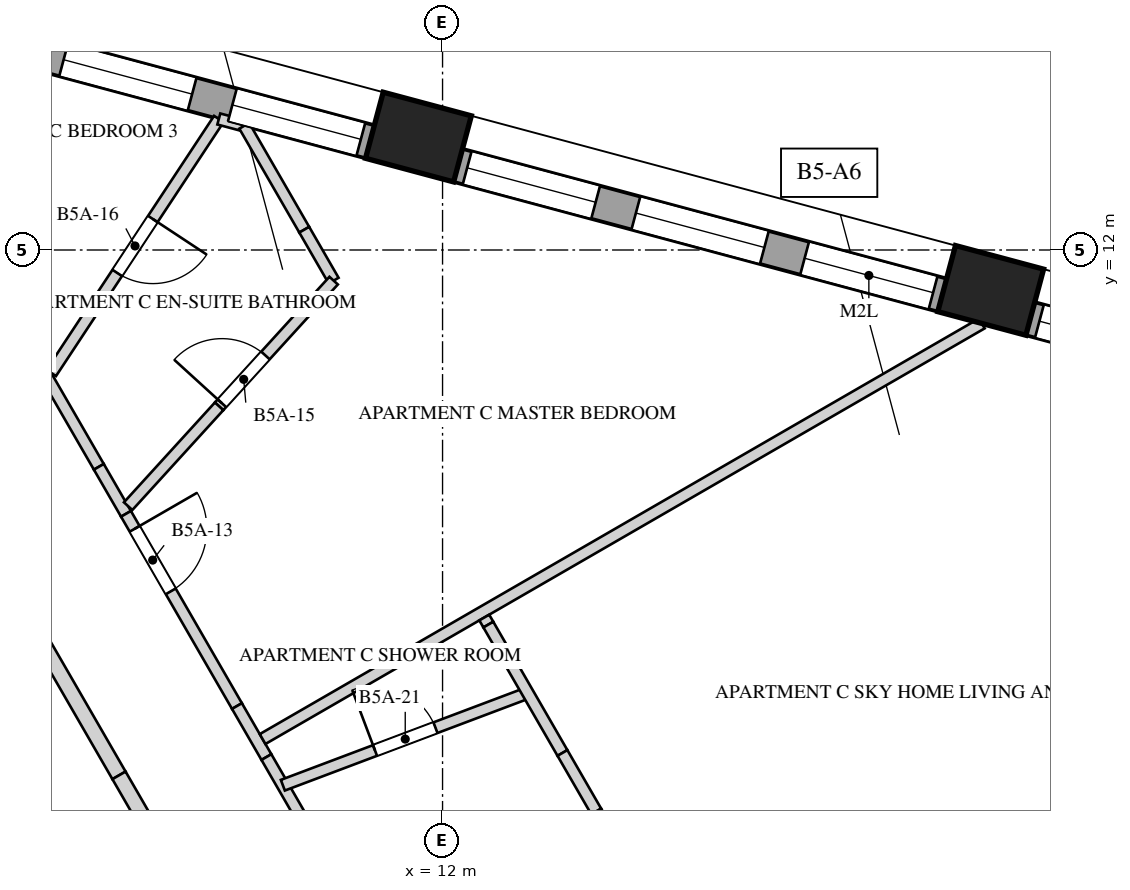
"""IFC4 building model, lengths in metres.
Left out: names, types, materials, properties, quantities, classifications, styles, units other than length and angle.
Written with IfcOpenShell. Run it as: python <this file> out.ifc"""

import sys

from ifc_helpers import new_model, si_unit, direction, frame, frame_2d, origin, origin_2d, place, context, subcontext, project, spatial, rectangle, extrude, element, fill, save


model = new_model("IFC4")
c1 = context("Model", 3, precision=1e-05, world=origin(), true_north=direction((0.0, 1.0)))
c2 = subcontext(c1, "Body", "Model", "MODEL_VIEW")
j1 = project(units=[si_unit("LENGTHUNIT", "METRE"), si_unit("PLANEANGLEUNIT", "RADIAN")], contexts=[c1])
p1 = place(None, origin())
s1 = spatial("IfcSite", under=j1, at=p1, CompositionType="ELEMENT")
p2 = place(p1, origin())
s2 = spatial("IfcBuilding", under=s1, at=p2, CompositionType="ELEMENT")
p3 = place(p2, frame((0.0, 0.0, 200.0)))
s3 = spatial("IfcBuildingStorey", under=s2, at=p3, CompositionType="ELEMENT", Elevation=200.0)
p4 = place(p3, frame((9.815, -4.25, 0.0), z_axis=(0.0, 0.0, 1.0), x_axis=(-0.500002161919, 0.866024155596, 0.0)))
e1 = element("IfcWall", 1, at=p4, inside=s3, PredefinedType="SHEAR", context=c2, shape_type="SweptSolid", body=[
    extrude(rectangle(XDim=17.176, YDim=0.75, at=frame_2d((8.588, 0.0))), origin(), (0.0, 0.0, 1.0), 4.0),
])
p5 = place(p4, frame((6.863, 0.0, 0.0)))
e2 = element("IfcOpeningElement", 2, at=p5, cuts=e1, PredefinedType="OPENING", context=c2, shape_type="SweptSolid", body=[
    extrude(rectangle(XDim=1.0, YDim=2.4, at=frame_2d((0.5, 1.2))), frame((0.0, 0.385, 0.0), z_axis=(0.0, -1.0, 0.0), x_axis=(1.0, 0.0, 0.0)), (0.0, 0.0, 1.0), 0.77),
])
for number, where, z_axis, x_axis in (
    (3, (19.211, 11.469, -0.35), (0.0, 0.0, 1.0), (-0.966, 0.259, 0.0)),
    (4, (11.683, 13.486, -0.35), (0.0, 0.0, 1.0), (-0.966, 0.259, 0.0)),
):
    element("IfcColumn", number, at=place(p3, frame(where, z_axis=z_axis, x_axis=x_axis)), inside=s3, PredefinedType="COLUMN", context=c2, shape_type="SweptSolid", body=[
        extrude(rectangle(XDim=1.2, YDim=0.9, at=origin_2d()), origin(), (0.0, 0.0, 1.0), 4.35),
    ])
p6 = place(p3, frame((21.663, 10.579, 0.0), z_axis=(0.0, 0.0, 1.0), x_axis=(-0.96593005298, 0.258803270362, 0.0)))
e5 = element("IfcWall", 5, at=p6, inside=s3, PredefinedType="SOLIDWALL", context=c2, shape_type="SweptSolid", body=[
    extrude(rectangle(XDim=1.998, YDim=0.45, at=frame_2d((0.999, 0.0))), origin(), (0.0, 0.0, 1.0), 3.3),
])
p7 = place(p6, frame((0.124, 0.0, 0.5)))
e6 = element("IfcOpeningElement", 6, at=p7, cuts=e5, PredefinedType="OPENING", context=c2, shape_type="SweptSolid", body=[
    extrude(rectangle(XDim=1.75, YDim=2.65, at=frame_2d((0.875, 1.325))), frame((0.0, 0.235, 0.0), z_axis=(0.0, -1.0, 0.0), x_axis=(1.0, 0.0, 0.0)), (0.0, 0.0, 1.0), 0.47),
])
p8 = place(p3, frame((18.573, 11.406, 0.0), z_axis=(0.0, 0.0, 1.0), x_axis=(-0.965921443251, 0.258835402268, 0.0)))
e7 = element("IfcWall", 7, at=p8, inside=s3, PredefinedType="SOLIDWALL", context=c2, shape_type="SweptSolid", body=[
    extrude(rectangle(XDim=6.594, YDim=0.45, at=frame_2d((3.297, 0.0))), origin(), (0.0, 0.0, 1.0), 3.3),
])
p9 = place(p8, frame((0.124, 0.0, 0.5)))
e8 = element("IfcOpeningElement", 8, at=p9, cuts=e7, PredefinedType="OPENING", context=c2, shape_type="SweptSolid", body=[
    extrude(rectangle(XDim=1.75, YDim=2.0, at=frame_2d((0.875, 1.0))), frame((0.0, 0.235, 0.0), z_axis=(0.0, -1.0, 0.0), x_axis=(1.0, 0.0, 0.0)), (0.0, 0.0, 1.0), 0.47),
])
p10 = place(p8, frame((2.422, 0.0, 0.5)))
e9 = element("IfcOpeningElement", 9, at=p10, cuts=e7, PredefinedType="OPENING", context=c2, shape_type="SweptSolid", body=[
    extrude(rectangle(XDim=1.75, YDim=2.65, at=frame_2d((0.875, 1.325))), frame((0.0, 0.235, 0.0), z_axis=(0.0, -1.0, 0.0), x_axis=(1.0, 0.0, 0.0)), (0.0, 0.0, 1.0), 0.47),
])
p11 = place(p8, frame((4.72, 0.0, 0.5)))
e10 = element("IfcOpeningElement", 10, at=p11, cuts=e7, PredefinedType="OPENING", context=c2, shape_type="SweptSolid", body=[
    extrude(rectangle(XDim=1.75, YDim=2.65, at=frame_2d((0.875, 1.325))), frame((0.0, 0.235, 0.0), z_axis=(0.0, -1.0, 0.0), x_axis=(1.0, 0.0, 0.0)), (0.0, 0.0, 1.0), 0.47),
])
p12 = place(p3, frame((11.045, 13.424, 0.0), z_axis=(0.0, 0.0, 1.0), x_axis=(-0.965933178973, 0.258791602952, 0.0)))
e11 = element("IfcWall", 11, at=p12, inside=s3, PredefinedType="SOLIDWALL", context=c2, shape_type="SweptSolid", body=[
    extrude(rectangle(XDim=6.594, YDim=0.45, at=frame_2d((3.297, 0.0))), origin(), (0.0, 0.0, 1.0), 3.3),
])
p13 = place(p12, frame((0.124, 0.0, 0.5)))
e12 = element("IfcOpeningElement", 12, at=p13, cuts=e11, PredefinedType="OPENING", context=c2, shape_type="SweptSolid", body=[
    extrude(rectangle(XDim=1.75, YDim=2.65, at=frame_2d((0.875, 1.325))), frame((0.0, 0.235, 0.0), z_axis=(0.0, -1.0, 0.0), x_axis=(1.0, 0.0, 0.0)), (0.0, 0.0, 1.0), 0.47),
])
p14 = place(p12, frame((2.422, 0.0, 0.5)))
e13 = element("IfcOpeningElement", 13, at=p14, cuts=e11, PredefinedType="OPENING", context=c2, shape_type="SweptSolid", body=[
    extrude(rectangle(XDim=1.75, YDim=2.65, at=frame_2d((0.875, 1.325))), frame((0.0, 0.235, 0.0), z_axis=(0.0, -1.0, 0.0), x_axis=(1.0, 0.0, 0.0)), (0.0, 0.0, 1.0), 0.47),
])
p15 = place(p12, frame((4.72, 0.0, 0.5)))
e14 = element("IfcOpeningElement", 14, at=p15, cuts=e11, PredefinedType="OPENING", context=c2, shape_type="SweptSolid", body=[
    extrude(rectangle(XDim=1.75, YDim=2.65, at=frame_2d((0.875, 1.325))), frame((0.0, 0.235, 0.0), z_axis=(0.0, -1.0, 0.0), x_axis=(1.0, 0.0, 0.0)), (0.0, 0.0, 1.0), 0.47),
])
p16 = place(p3, frame((4.283, 14.681, 0.0), z_axis=(0.0, 0.0, 1.0), x_axis=(0.500010206181, -0.866019511163, 0.0)))
e15 = element("IfcWall", 15, at=p16, inside=s3, PredefinedType="PARTITIONING", context=c2, shape_type="SweptSolid", body=[
    extrude(rectangle(XDim=6.389, YDim=0.15, at=frame_2d((3.195, 0.0))), origin(), (0.0, 0.0, 1.0), 3.65),
])
p17 = place(p16, frame((1.849, 0.0, 0.0)))
e16 = element("IfcOpeningElement", 16, at=p17, cuts=e15, PredefinedType="OPENING", context=c2, shape_type="SweptSolid", body=[
    extrude(rectangle(XDim=0.95, YDim=2.4, at=frame_2d((0.475, 1.2))), frame((0.0, 0.085, 0.0), z_axis=(0.0, -1.0, 0.0), x_axis=(1.0, 0.0, 0.0)), (0.0, 0.0, 1.0), 0.17),
])
p18 = place(p3, frame((7.478, 9.148, 0.0), z_axis=(0.0, 0.0, 1.0), x_axis=(0.499998569178, -0.866026229868, 0.0)))
e17 = element("IfcWall", 17, at=p18, inside=s3, PredefinedType="PARTITIONING", context=c2, shape_type="SweptSolid", body=[
    extrude(rectangle(XDim=0.714, YDim=0.15, at=frame_2d((0.357, 0.0))), origin(), (0.0, 0.0, 1.0), 2.95),
])
p19 = place(p3, frame((7.835, 8.529, 0.0), z_axis=(0.0, 0.0, 1.0), x_axis=(0.49998782916, -0.866032430508, 0.0)))
e18 = element("IfcWall", 18, at=p19, inside=s3, PredefinedType="PARTITIONING", context=c2, shape_type="SweptSolid", body=[
    extrude(rectangle(XDim=2.92, YDim=0.15, at=frame_2d((1.46, 0.0))), origin(), (0.0, 0.0, 1.0), 3.65),
])
p20 = place(p19, frame((0.228, 0.0, 0.0)))
e19 = element("IfcOpeningElement", 19, at=p20, cuts=e18, PredefinedType="OPENING", context=c2, shape_type="SweptSolid", body=[
    extrude(rectangle(XDim=0.95, YDim=2.4, at=frame_2d((0.475, 1.2))), frame((0.0, 0.085, 0.0), z_axis=(0.0, -1.0, 0.0), x_axis=(1.0, 0.0, 0.0)), (0.0, 0.0, 1.0), 0.17),
])
p21 = place(p3, frame((9.295, 6.0, 0.0), z_axis=(0.0, 0.0, 1.0), x_axis=(0.500204125617, -0.865907519724, 0.0)))
e20 = element("IfcWall", 20, at=p21, inside=s3, PredefinedType="PARTITIONING", context=c2, shape_type="SweptSolid", body=[
    extrude(rectangle(XDim=0.775, YDim=0.15, at=frame_2d((0.388, 0.0))), origin(), (0.0, 0.0, 1.0), 2.75),
])
p22 = place(p3, frame((9.683, 5.329, 0.0), z_axis=(0.0, 0.0, 1.0), x_axis=(0.499787711288, -0.866147934042, 0.0)))
e21 = element("IfcWall", 21, at=p22, inside=s3, PredefinedType="PARTITIONING", context=c2, shape_type="SweptSolid", body=[
    extrude(rectangle(XDim=1.295, YDim=0.15, at=frame_2d((0.648, 0.0))), origin(), (0.0, 0.0, 1.0), 3.65),
])
p23 = place(p3, frame((9.057, 13.724, 0.0), z_axis=(0.0, 0.0, 1.0), x_axis=(-0.550767438832, -0.834658749623, 0.0)))
e22 = element("IfcWall", 22, at=p23, inside=s3, PredefinedType="PARTITIONING", context=c2, shape_type="SweptSolid", body=[
    extrude(rectangle(XDim=4.003, YDim=0.15, at=frame_2d((2.001, 0.0))), origin(), (0.0, 0.0, 1.0), 3.65),
])
p24 = place(p23, frame((1.577, 0.0, 0.0)))
e23 = element("IfcOpeningElement", 23, at=p24, cuts=e22, PredefinedType="OPENING", context=c2, shape_type="SweptSolid", body=[
    extrude(rectangle(XDim=0.85, YDim=2.4, at=frame_2d((0.425, 1.2))), frame((0.0, 0.085, 0.0), z_axis=(0.0, -1.0, 0.0), x_axis=(1.0, 0.0, 0.0)), (0.0, 0.0, 1.0), 0.17),
])
p25 = place(p3, frame((9.057, 13.724, 0.0), z_axis=(0.0, 0.0, 1.0), x_axis=(0.96594175785, -0.258759580387, 0.0)))
e24 = element("IfcWall", 24, at=p25, inside=s3, PredefinedType="PARTITIONING", context=c2, shape_type="SweptSolid", body=[
    extrude(rectangle(XDim=0.346, YDim=0.15, at=frame_2d((0.173, 0.0))), origin(), (0.0, 0.0, 1.0), 3.65),
])
p26 = place(p3, frame((9.391, 13.634, 0.0), z_axis=(0.0, 0.0, 1.0), x_axis=(0.500048238042, -0.865997551747, 0.0)))
e25 = element("IfcWall", 25, at=p26, inside=s3, PredefinedType="PARTITIONING", context=c2, shape_type="SweptSolid", body=[
    extrude(rectangle(XDim=1.578, YDim=0.15, at=frame_2d((0.789, 0.0))), origin(), (0.0, 0.0, 1.0), 3.65),
])
p27 = place(p3, frame((10.18, 12.267, 0.0), z_axis=(0.0, 0.0, 1.0), x_axis=(0.499804398801, -0.866138304741, 0.0)))
e26 = element("IfcWall", 26, at=p27, inside=s3, PredefinedType="PARTITIONING", context=c2, shape_type="SweptSolid", body=[
    extrude(rectangle(XDim=0.774, YDim=0.15, at=frame_2d((0.387, 0.0))), origin(), (0.0, 0.0, 1.0), 2.95),
])
p28 = place(p3, frame((9.633, 5.566, 0.0), z_axis=(0.0, 0.0, 1.0), x_axis=(0.865840987412, 0.500319282576, 0.0)))
e27 = element("IfcWall", 27, at=p28, inside=s3, PredefinedType="PARTITIONING", context=c2, shape_type="SweptSolid", body=[
    extrude(rectangle(XDim=10.928, YDim=0.15, at=frame_2d((5.464, 0.0))), origin(), (0.0, 0.0, 1.0), 2.75),
])
p29 = place(p3, frame((9.899, 4.959, 0.0), z_axis=(0.0, 0.0, 1.0), x_axis=(0.935727228965, 0.352724471752, 0.0)))
e28 = element("IfcWall", 28, at=p29, inside=s3, PredefinedType="PARTITIONING", context=c2, shape_type="SweptSolid", body=[
    extrude(rectangle(XDim=3.441, YDim=0.15, at=frame_2d((1.721, 0.0))), origin(), (0.0, 0.0, 1.0), 3.65),
])
p30 = place(p29, frame((1.296, 0.0, 0.0)))
e29 = element("IfcOpeningElement", 29, at=p30, cuts=e28, PredefinedType="OPENING", context=c2, shape_type="SweptSolid", body=[
    extrude(rectangle(XDim=0.85, YDim=2.4, at=frame_2d((0.425, 1.2))), frame((0.0, 0.085, 0.0), z_axis=(0.0, -1.0, 0.0), x_axis=(1.0, 0.0, 0.0)), (0.0, 0.0, 1.0), 0.17),
])
p31 = place(p3, frame((9.06, 9.943, 0.0), z_axis=(0.0, 0.0, 1.0), x_axis=(0.673552274043, 0.739139590423, 0.0)))
e30 = element("IfcWall", 30, at=p31, inside=s3, PredefinedType="PARTITIONING", context=c2, shape_type="SweptSolid", body=[
    extrude(rectangle(XDim=2.237, YDim=0.15, at=frame_2d((1.119, 0.0))), origin(), (0.0, 0.0, 1.0), 3.65),
])
p32 = place(p31, frame((0.055, 0.0, 0.0)))
e31 = element("IfcOpeningElement", 31, at=p32, cuts=e30, PredefinedType="OPENING", context=c2, shape_type="SweptSolid", body=[
    extrude(rectangle(XDim=0.85, YDim=2.4, at=frame_2d((0.425, 1.2))), frame((0.0, 0.085, 0.0), z_axis=(0.0, -1.0, 0.0), x_axis=(1.0, 0.0, 0.0)), (0.0, 0.0, 1.0), 0.17),
])
p33 = place(p3, frame((9.06, 9.943, 0.0), z_axis=(0.0, 0.0, 1.0), x_axis=(-0.673506679072, -0.739181136966, 0.0)))
e32 = element("IfcWall", 32, at=p33, inside=s3, PredefinedType="PARTITIONING", context=c2, shape_type="SweptSolid", body=[
    extrude(rectangle(XDim=1.777, YDim=0.15, at=frame_2d((0.888, 0.0))), origin(), (0.0, 0.0, 1.0), 2.95),
])
p34 = place(p3, frame((12.549, 7.165, 0.0), z_axis=(0.0, 0.0, 1.0), x_axis=(0.501036270542, -0.865426285481, 0.0)))
e33 = element("IfcWall", 33, at=p34, inside=s3, PredefinedType="PARTITIONING", context=c2, shape_type="SweptSolid", body=[
    extrude(rectangle(XDim=0.107, YDim=0.15, at=frame_2d((0.054, 0.0))), origin(), (0.0, 0.0, 1.0), 2.75),
])
p35 = place(p3, frame((12.603, 7.072, 0.0), z_axis=(0.0, 0.0, 1.0), x_axis=(0.49995005938, -0.866054235095, 0.0)))
e34 = element("IfcWall", 34, at=p35, inside=s3, PredefinedType="PARTITIONING", context=c2, shape_type="SweptSolid", body=[
    extrude(rectangle(XDim=1.95, YDim=0.15, at=frame_2d((0.975, 0.0))), origin(), (0.0, 0.0, 1.0), 3.65),
])
p36 = place(p3, frame((13.577, 5.383, 0.0), z_axis=(0.0, 0.0, 1.0), x_axis=(0.499920601425, -0.866071239721, 0.0)))
e35 = element("IfcWall", 35, at=p36, inside=s3, PredefinedType="PARTITIONING", context=c2, shape_type="SweptSolid", body=[
    extrude(rectangle(XDim=0.889, YDim=0.15, at=frame_2d((0.444, 0.0))), origin(), (0.0, 0.0, 1.0), 2.55),
])
p37 = place(p3, frame((14.022, 4.614, 0.0), z_axis=(0.0, 0.0, 1.0), x_axis=(0.50005746179, -0.865992225662, 0.0)))
e36 = element("IfcWall", 36, at=p37, inside=s3, PredefinedType="PARTITIONING", context=c2, shape_type="SweptSolid", body=[
    extrude(rectangle(XDim=1.219, YDim=0.15, at=frame_2d((0.61, 0.0))), origin(), (0.0, 0.0, 1.0), 3.65),
])
p38 = place(p3, frame((6.594, 7.078, 0.0), z_axis=(0.0, 0.0, 1.0), x_axis=(0.500013761451, -0.866017458461, 0.0)))
e37 = element("IfcWall", 37, at=p38, inside=s3, PredefinedType="SOLIDWALL", context=c2, shape_type="SweptSolid", body=[
    extrude(rectangle(XDim=2.297, YDim=0.2, at=frame_2d((1.149, 0.0))), origin(), (0.0, 0.0, 1.0), 3.65),
])
p39 = place(p3, frame((7.743, 5.088, 0.0), z_axis=(0.0, 0.0, 1.0), x_axis=(0.500109828528, -0.865961984968, 0.0)))
e38 = element("IfcWall", 38, at=p39, inside=s3, PredefinedType="SOLIDWALL", context=c2, shape_type="SweptSolid", body=[
    extrude(rectangle(XDim=0.8, YDim=0.2, at=frame_2d((0.4, 0.0))), origin(), (0.0, 0.0, 1.0), 2.75),
])
p40 = place(p7, origin())
e39 = element("IfcWindow", 39, at=p40, inside=s3, PartitioningType="SINGLE_PANEL", PredefinedType="WINDOW", context=c2, shape_type="SweptSolid", body=[
    extrude(rectangle(XDim=1.75, YDim=2.65, at=frame_2d((0.875, 1.325))), frame((0.0, 0.03, 0.0), z_axis=(0.0, -1.0, 0.0), x_axis=(1.0, 0.0, 0.0)), (0.0, 0.0, 1.0), 0.06),
])
fill(e6, e39)
p41 = place(p9, origin())
e40 = element("IfcWindow", 40, at=p41, inside=s3, PartitioningType="SINGLE_PANEL", PredefinedType="WINDOW", context=c2, shape_type="SweptSolid", body=[
    extrude(rectangle(XDim=1.75, YDim=2.0, at=frame_2d((0.875, 1.0))), frame((0.0, 0.03, 0.0), z_axis=(0.0, -1.0, 0.0), x_axis=(1.0, 0.0, 0.0)), (0.0, 0.0, 1.0), 0.06),
])
fill(e8, e40)
p42 = place(p10, origin())
e41 = element("IfcWindow", 41, at=p42, inside=s3, PartitioningType="SINGLE_PANEL", PredefinedType="WINDOW", context=c2, shape_type="SweptSolid", body=[
    extrude(rectangle(XDim=1.75, YDim=2.65, at=frame_2d((0.875, 1.325))), frame((0.0, 0.03, 0.0), z_axis=(0.0, -1.0, 0.0), x_axis=(1.0, 0.0, 0.0)), (0.0, 0.0, 1.0), 0.06),
])
fill(e9, e41)
p43 = place(p11, origin())
e42 = element("IfcWindow", 42, at=p43, inside=s3, PartitioningType="SINGLE_PANEL", PredefinedType="WINDOW", context=c2, shape_type="SweptSolid", body=[
    extrude(rectangle(XDim=1.75, YDim=2.65, at=frame_2d((0.875, 1.325))), frame((0.0, 0.03, 0.0), z_axis=(0.0, -1.0, 0.0), x_axis=(1.0, 0.0, 0.0)), (0.0, 0.0, 1.0), 0.06),
])
fill(e10, e42)
p44 = place(p13, origin())
e43 = element("IfcWindow", 43, at=p44, inside=s3, PartitioningType="SINGLE_PANEL", PredefinedType="WINDOW", context=c2, shape_type="SweptSolid", body=[
    extrude(rectangle(XDim=1.75, YDim=2.65, at=frame_2d((0.875, 1.325))), frame((0.0, 0.03, 0.0), z_axis=(0.0, -1.0, 0.0), x_axis=(1.0, 0.0, 0.0)), (0.0, 0.0, 1.0), 0.06),
])
fill(e12, e43)
p45 = place(p14, origin())
e44 = element("IfcWindow", 44, at=p45, inside=s3, PartitioningType="SINGLE_PANEL", PredefinedType="WINDOW", context=c2, shape_type="SweptSolid", body=[
    extrude(rectangle(XDim=1.75, YDim=2.65, at=frame_2d((0.875, 1.325))), frame((0.0, 0.03, 0.0), z_axis=(0.0, -1.0, 0.0), x_axis=(1.0, 0.0, 0.0)), (0.0, 0.0, 1.0), 0.06),
])
fill(e13, e44)
p46 = place(p20, origin())
e45 = element("IfcDoor", 45, at=p46, inside=s3, OperationType="SINGLE_SWING_LEFT", PredefinedType="DOOR", context=c2, shape_type="SweptSolid", body=[
    extrude(rectangle(XDim=0.95, YDim=2.4, at=frame_2d((0.475, 1.2))), frame((0.0, 0.025, 0.0), z_axis=(0.0, -1.0, 0.0), x_axis=(1.0, 0.0, 0.0)), (0.0, 0.0, 1.0), 0.05),
])
fill(e19, e45)
p47 = place(p32, origin())
e46 = element("IfcDoor", 46, at=p47, inside=s3, OperationType="SINGLE_SWING_LEFT", PredefinedType="DOOR", context=c2, shape_type="SweptSolid", body=[
    extrude(rectangle(XDim=0.85, YDim=2.4, at=frame_2d((0.425, 1.2))), frame((0.0, 0.025, 0.0), z_axis=(0.0, -1.0, 0.0), x_axis=(1.0, 0.0, 0.0)), (0.0, 0.0, 1.0), 0.05),
])
fill(e31, e46)
p48 = place(p24, origin())
e47 = element("IfcDoor", 47, at=p48, inside=s3, OperationType="SINGLE_SWING_RIGHT", PredefinedType="DOOR", context=c2, shape_type="SweptSolid", body=[
    extrude(rectangle(XDim=0.85, YDim=2.4, at=frame_2d((0.425, 1.2))), frame((0.0, 0.025, 0.0), z_axis=(0.0, -1.0, 0.0), x_axis=(1.0, 0.0, 0.0)), (0.0, 0.0, 1.0), 0.05),
])
fill(e23, e47)
p49 = place(p30, origin())
e48 = element("IfcDoor", 48, at=p49, inside=s3, OperationType="SINGLE_SWING_LEFT", PredefinedType="DOOR", context=c2, shape_type="SweptSolid", body=[
    extrude(rectangle(XDim=0.85, YDim=2.4, at=frame_2d((0.425, 1.2))), frame((0.0, 0.025, 0.0), z_axis=(0.0, -1.0, 0.0), x_axis=(1.0, 0.0, 0.0)), (0.0, 0.0, 1.0), 0.05),
])
fill(e29, e48)
save(model, sys.argv[1])
